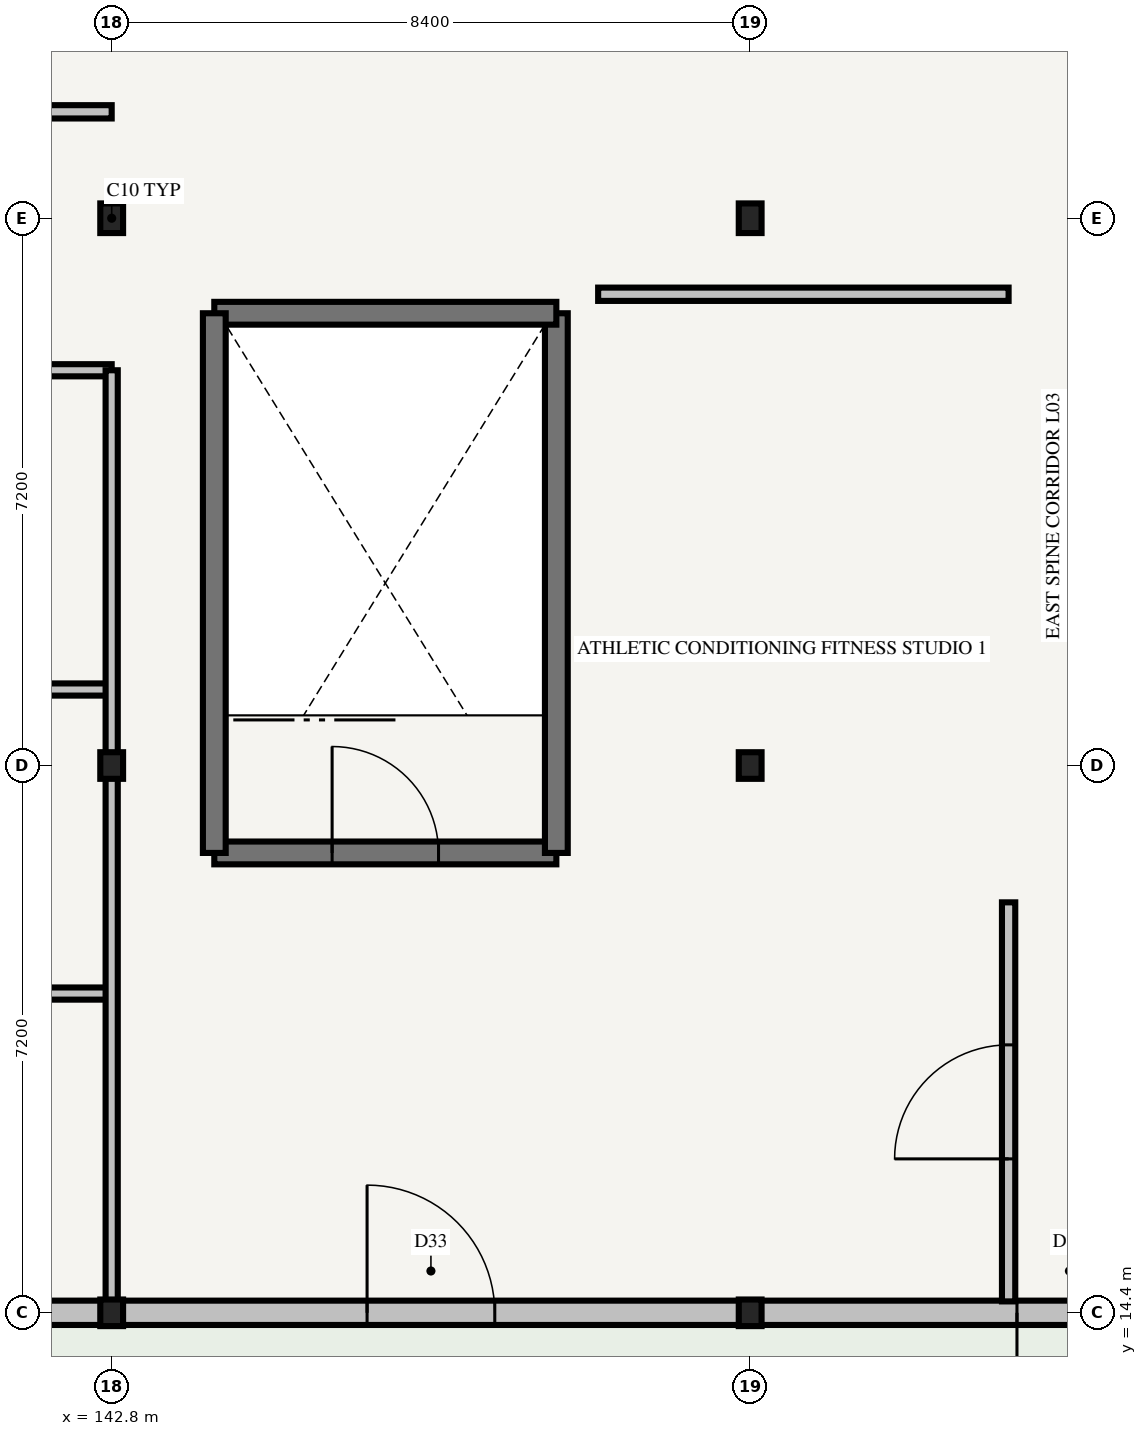
"""IFC4 building model, lengths in metres.
Left out: names, types, materials, properties, quantities, classifications, styles, units other than length and angle.
Written with IfcOpenShell. Run it as: python <this file> out.ifc"""

import sys

from ifc_helpers import new_model, si_unit, direction, frame, frame_2d, origin, origin_2d, place, context, subcontext, project, spatial, rectangle, i_section, extrude, element, fill, save


model = new_model("IFC4")
c1 = context("Model", 3, precision=1e-05, world=origin(), true_north=direction((0.0, 1.0)))
c2 = subcontext(c1, "Body", "Model", "MODEL_VIEW")
j1 = project(units=[si_unit("LENGTHUNIT", "METRE"), si_unit("PLANEANGLEUNIT", "RADIAN")], contexts=[c1])
p1 = place(None, origin())
s1 = spatial("IfcSite", under=j1, at=p1, CompositionType="ELEMENT")
p2 = place(p1, origin())
s2 = spatial("IfcBuilding", under=s1, at=p2, CompositionType="ELEMENT")
p3 = place(p2, frame((0.0, 0.0, 12.9)))
s3 = spatial("IfcBuildingStorey", under=s2, at=p3, CompositionType="ELEMENT", Elevation=12.9)
for number, where, z_axis, x_axis in (
    (1, (142.8, 14.4, 0.0), (0.0, 0.0, 1.0), (1.0, 0.0, 0.0)),
    (2, (142.8, 21.6, 0.0), (0.0, 0.0, 1.0), (1.0, 0.0, 0.0)),
):
    element("IfcColumn", number, at=place(p3, frame(where, z_axis=z_axis, x_axis=x_axis)), inside=s3, PredefinedType="COLUMN", context=c2, shape_type="SweptSolid", body=[
        extrude(i_section(OverallWidth=0.3, OverallDepth=0.35, WebThickness=0.01, FlangeThickness=0.018, FilletRadius=0.027, at=origin_2d()), origin(), (0.0, 0.0, 1.0), 4.2),
    ])
p4 = place(p3, frame((142.8, 28.8, 0.0), z_axis=(0.0, 0.0, 1.0), x_axis=(1.0, 0.0, 0.0)))
e3 = element("IfcColumn", 3, at=p4, inside=s3, PredefinedType="COLUMN", context=c2, shape_type="SweptSolid", body=[
    extrude(i_section(OverallWidth=0.3, OverallDepth=0.39, WebThickness=0.011, FlangeThickness=0.019, FilletRadius=0.027, at=origin_2d()), origin(), (0.0, 0.0, 1.0), 4.2),
])
for number, where, z_axis, x_axis in (
    (4, (151.2, 14.4, 0.0), (0.0, 0.0, 1.0), (1.0, 0.0, 0.0)),
    (5, (151.2, 21.6, 0.0), (0.0, 0.0, 1.0), (1.0, 0.0, 0.0)),
):
    element("IfcColumn", number, at=place(p3, frame(where, z_axis=z_axis, x_axis=x_axis)), inside=s3, PredefinedType="COLUMN", context=c2, shape_type="SweptSolid", body=[
        extrude(i_section(OverallWidth=0.3, OverallDepth=0.35, WebThickness=0.01, FlangeThickness=0.018, FilletRadius=0.027, at=origin_2d()), origin(), (0.0, 0.0, 1.0), 4.2),
    ])
p5 = place(p3, frame((151.2, 28.8, 0.0), z_axis=(0.0, 0.0, 1.0), x_axis=(1.0, 0.0, 0.0)))
e6 = element("IfcColumn", 6, at=p5, inside=s3, PredefinedType="COLUMN", context=c2, shape_type="SweptSolid", body=[
    extrude(i_section(OverallWidth=0.3, OverallDepth=0.39, WebThickness=0.011, FlangeThickness=0.019, FilletRadius=0.027, at=origin_2d()), origin(), (0.0, 0.0, 1.0), 4.2),
])
p6 = place(p3, frame((134.4, 14.4, 0.0), z_axis=(0.0, 0.0, 1.0), x_axis=(1.0, 0.0, 0.0)))
e7 = element("IfcWall", 7, at=p6, inside=s3, PredefinedType="STANDARD", context=c2, shape_type="SweptSolid", body=[
    extrude(rectangle(XDim=8.4, YDim=0.32, at=frame_2d((4.2, 0.0))), origin(), (0.0, 0.0, 1.0), 3.495),
])
p7 = place(p6, frame((3.45, 0.0, 0.85)))
e8 = element("IfcOpeningElement", 8, at=p7, cuts=e7, PredefinedType="OPENING", context=c2, shape_type="SweptSolid", body=[
    extrude(rectangle(XDim=1.5, YDim=1.8, at=frame_2d((0.75, 0.9))), frame((0.0, 0.185, 0.0), z_axis=(0.0, -1.0, 0.0), x_axis=(1.0, 0.0, 0.0)), (0.0, 0.0, 1.0), 0.37),
])
p8 = place(p3, frame((142.8, 14.4, 0.0), z_axis=(0.0, 0.0, 1.0), x_axis=(1.0, 0.0, 0.0)))
e9 = element("IfcWall", 9, at=p8, inside=s3, PredefinedType="STANDARD", context=c2, shape_type="SweptSolid", body=[
    extrude(rectangle(XDim=8.4, YDim=0.32, at=frame_2d((4.2, 0.0))), origin(), (0.0, 0.0, 1.0), 3.445),
])
p9 = place(p8, frame((3.36, 0.0, 0.0)))
e10 = element("IfcOpeningElement", 10, at=p9, cuts=e9, PredefinedType="OPENING", context=c2, shape_type="SweptSolid", body=[
    extrude(rectangle(XDim=1.68, YDim=2.3, at=frame_2d((0.84, 1.15))), frame((0.0, 0.185, 0.0), z_axis=(0.0, -1.0, 0.0), x_axis=(1.0, 0.0, 0.0)), (0.0, 0.0, 1.0), 0.37),
])
p10 = place(p3, frame((151.2, 14.4, 0.0), z_axis=(0.0, 0.0, 1.0), x_axis=(1.0, 0.0, 0.0)))
e11 = element("IfcWall", 11, at=p10, inside=s3, PredefinedType="STANDARD", context=c2, shape_type="SweptSolid", body=[
    extrude(rectangle(XDim=8.4, YDim=0.32, at=frame_2d((4.2, 0.0))), origin(), (0.0, 0.0, 1.0), 3.445),
])
p11 = place(p10, frame((3.51, 0.0, 0.0)))
e12 = element("IfcOpeningElement", 12, at=p11, cuts=e11, PredefinedType="OPENING", context=c2, shape_type="SweptSolid", body=[
    extrude(rectangle(XDim=1.38, YDim=2.25, at=frame_2d((0.69, 1.125))), frame((0.0, 0.185, 0.0), z_axis=(0.0, -1.0, 0.0), x_axis=(1.0, 0.0, 0.0)), (0.0, 0.0, 1.0), 0.37),
])
p12 = place(p3, frame((144.15, 20.45, 0.0), z_axis=(0.0, 0.0, 1.0), x_axis=(1.0, 0.0, 0.0)))
e13 = element("IfcWall", 13, at=p12, inside=s3, PredefinedType="SHEAR", context=c2, shape_type="SweptSolid", body=[
    extrude(rectangle(XDim=4.5, YDim=0.3, at=frame_2d((2.25, 0.0))), origin(), (0.0, 0.0, 1.0), 4.56),
])
p13 = place(p12, frame((1.55, 0.0, 0.0)))
e14 = element("IfcOpeningElement", 14, at=p13, cuts=e13, PredefinedType="OPENING", context=c2, shape_type="SweptSolid", body=[
    extrude(rectangle(XDim=1.4, YDim=2.2, at=frame_2d((0.7, 1.1))), frame((0.0, 0.175, 0.0), z_axis=(0.0, -1.0, 0.0), x_axis=(1.0, 0.0, 0.0)), (0.0, 0.0, 1.0), 0.35),
])
p14 = place(p3, frame((148.65, 20.45, 0.0), z_axis=(0.0, 0.0, 1.0), x_axis=(0.0, 1.0, 0.0)))
e15 = element("IfcWall", 15, at=p14, inside=s3, PredefinedType="SHEAR", context=c2, shape_type="SweptSolid", body=[
    extrude(rectangle(XDim=7.1, YDim=0.3, at=frame_2d((3.55, 0.0))), origin(), (0.0, 0.0, 1.0), 4.56),
])
p15 = place(p3, frame((148.65, 27.55, 0.0), z_axis=(0.0, 0.0, 1.0), x_axis=(-1.0, 0.0, 0.0)))
e16 = element("IfcWall", 16, at=p15, inside=s3, PredefinedType="SHEAR", context=c2, shape_type="SweptSolid", body=[
    extrude(rectangle(XDim=4.5, YDim=0.3, at=frame_2d((2.25, 0.0))), origin(), (0.0, 0.0, 1.0), 4.56),
])
p16 = place(p3, frame((144.15, 27.55, 0.0), z_axis=(0.0, 0.0, 1.0), x_axis=(0.0, -1.0, 0.0)))
e17 = element("IfcWall", 17, at=p16, inside=s3, PredefinedType="SHEAR", context=c2, shape_type="SweptSolid", body=[
    extrude(rectangle(XDim=7.1, YDim=0.3, at=frame_2d((3.55, 0.0))), origin(), (0.0, 0.0, 1.0), 4.56),
])
p17 = place(p3, frame((126.15, 30.2, 0.0), z_axis=(0.0, 0.0, 1.0), x_axis=(1.0, 0.0, 0.0)))
e18 = element("IfcWall", 18, at=p17, inside=s3, PredefinedType="PARTITIONING", context=c2, shape_type="SweptSolid", body=[
    extrude(rectangle(XDim=16.65, YDim=0.175, at=frame_2d((8.325, 0.0))), origin(), (0.0, 0.0, 1.0), 3.32),
])
p18 = place(p17, frame((5.375, 0.0, 0.0)))
e19 = element("IfcOpeningElement", 19, at=p18, cuts=e18, PredefinedType="OPENING", context=c2, shape_type="SweptSolid", body=[
    extrude(rectangle(XDim=1.5, YDim=2.2, at=frame_2d((0.75, 1.1))), frame((0.0, 0.112, 0.0), z_axis=(0.0, -1.0, 0.0), x_axis=(1.0, 0.0, 0.0)), (0.0, 0.0, 1.0), 0.225),
])
for number, where, z_axis, x_axis in (
    (20, (136.9, 18.6, 0.0), (0.0, 0.0, 1.0), (1.0, 0.0, 0.0)),
    (21, (136.9, 22.6, 0.0), (0.0, 0.0, 1.0), (1.0, 0.0, 0.0)),
):
    element("IfcWall", number, at=place(p3, frame(where, z_axis=z_axis, x_axis=x_axis)), inside=s3, PredefinedType="PARTITIONING", context=c2, shape_type="SweptSolid", body=[
        extrude(rectangle(XDim=5.9, YDim=0.16, at=frame_2d((2.95, 0.0))), origin(), (0.0, 0.0, 1.0), 3.32),
    ])
p19 = place(p3, frame((136.8, 26.8, 0.0), z_axis=(0.0, 0.0, 1.0), x_axis=(1.0, 0.0, 0.0)))
e22 = element("IfcWall", 22, at=p19, inside=s3, PredefinedType="PARTITIONING", context=c2, shape_type="SweptSolid", body=[
    extrude(rectangle(XDim=6.0, YDim=0.16, at=frame_2d((3.0, 0.0))), origin(), (0.0, 0.0, 1.0), 3.32),
])
p20 = place(p3, frame((142.8, 14.55, 0.0), z_axis=(0.0, 0.0, 1.0), x_axis=(0.0, 1.0, 0.0)))
e23 = element("IfcWall", 23, at=p20, inside=s3, PredefinedType="PARTITIONING", context=c2, shape_type="SweptSolid", body=[
    extrude(rectangle(XDim=12.25, YDim=0.16, at=frame_2d((6.125, 0.0))), origin(), (0.0, 0.0, 1.0), 3.32),
])
p21 = place(p3, frame((154.6, 14.55, 0.0), z_axis=(0.0, 0.0, 1.0), x_axis=(0.0, 1.0, 0.0)))
e24 = element("IfcWall", 24, at=p21, inside=s3, PredefinedType="PARTITIONING", context=c2, shape_type="SweptSolid", body=[
    extrude(rectangle(XDim=5.25, YDim=0.175, at=frame_2d((2.625, 0.0))), origin(), (0.0, 0.0, 1.0), 3.32),
])
p22 = place(p21, frame((1.875, 0.0, 0.0)))
e25 = element("IfcOpeningElement", 25, at=p22, cuts=e24, PredefinedType="OPENING", context=c2, shape_type="SweptSolid", body=[
    extrude(rectangle(XDim=1.5, YDim=2.2, at=frame_2d((0.75, 1.1))), frame((0.0, 0.112, 0.0), z_axis=(0.0, -1.0, 0.0), x_axis=(1.0, 0.0, 0.0)), (0.0, 0.0, 1.0), 0.225),
])
p23 = place(p3, frame((149.2, 27.8, 0.0), z_axis=(0.0, 0.0, 1.0), x_axis=(1.0, 0.0, 0.0)))
e26 = element("IfcWall", 26, at=p23, inside=s3, PredefinedType="PARTITIONING", context=c2, shape_type="SweptSolid", body=[
    extrude(rectangle(XDim=5.4, YDim=0.175, at=frame_2d((2.7, 0.0))), origin(), (0.0, 0.0, 1.0), 3.32),
])
p24 = place(p9, frame((1.68, 0.0, 0.0), z_axis=(0.0, 0.0, 1.0), x_axis=(-1.0, 0.0, 0.0)))
e27 = element("IfcDoor", 27, at=p24, inside=s3, OperationType="SINGLE_SWING_LEFT", PredefinedType="DOOR", context=c2, shape_type="SweptSolid", body=[
    extrude(rectangle(XDim=1.68, YDim=2.3, at=frame_2d((0.84, 1.15))), frame((0.0, 0.025, 0.0), z_axis=(0.0, -1.0, 0.0), x_axis=(1.0, 0.0, 0.0)), (0.0, 0.0, 1.0), 0.05),
])
fill(e10, e27)
p25 = place(p11, frame((1.38, 0.0, 0.0), z_axis=(0.0, 0.0, 1.0), x_axis=(-1.0, 0.0, 0.0)))
e28 = element("IfcDoor", 28, at=p25, inside=s3, OperationType="SINGLE_SWING_RIGHT", PredefinedType="DOOR", context=c2, shape_type="SweptSolid", body=[
    extrude(rectangle(XDim=1.38, YDim=2.25, at=frame_2d((0.69, 1.125))), frame((0.0, 0.025, 0.0), z_axis=(0.0, -1.0, 0.0), x_axis=(1.0, 0.0, 0.0)), (0.0, 0.0, 1.0), 0.05),
])
fill(e12, e28)
p26 = place(p13, frame((1.4, 0.0, 0.0), z_axis=(0.0, 0.0, 1.0), x_axis=(-1.0, 0.0, 0.0)))
e29 = element("IfcDoor", 29, at=p26, inside=s3, OperationType="SINGLE_SWING_LEFT", PredefinedType="DOOR", context=c2, shape_type="SweptSolid", body=[
    extrude(rectangle(XDim=1.4, YDim=2.2, at=frame_2d((0.7, 1.1))), frame((0.0, 0.025, 0.0), z_axis=(0.0, -1.0, 0.0), x_axis=(1.0, 0.0, 0.0)), (0.0, 0.0, 1.0), 0.05),
])
fill(e14, e29)
p27 = place(p22, frame((1.5, 0.0, 0.0), z_axis=(0.0, 0.0, 1.0), x_axis=(-1.0, 0.0, 0.0)))
e30 = element("IfcDoor", 30, at=p27, inside=s3, OperationType="DOUBLE_DOOR_SINGLE_SWING", PredefinedType="DOOR", context=c2, shape_type="SweptSolid", body=[
    extrude(rectangle(XDim=1.5, YDim=2.2, at=frame_2d((0.75, 1.1))), frame((0.0, 0.025, 0.0), z_axis=(0.0, -1.0, 0.0), x_axis=(1.0, 0.0, 0.0)), (0.0, 0.0, 1.0), 0.05),
])
fill(e25, e30)
save(model, sys.argv[1])
